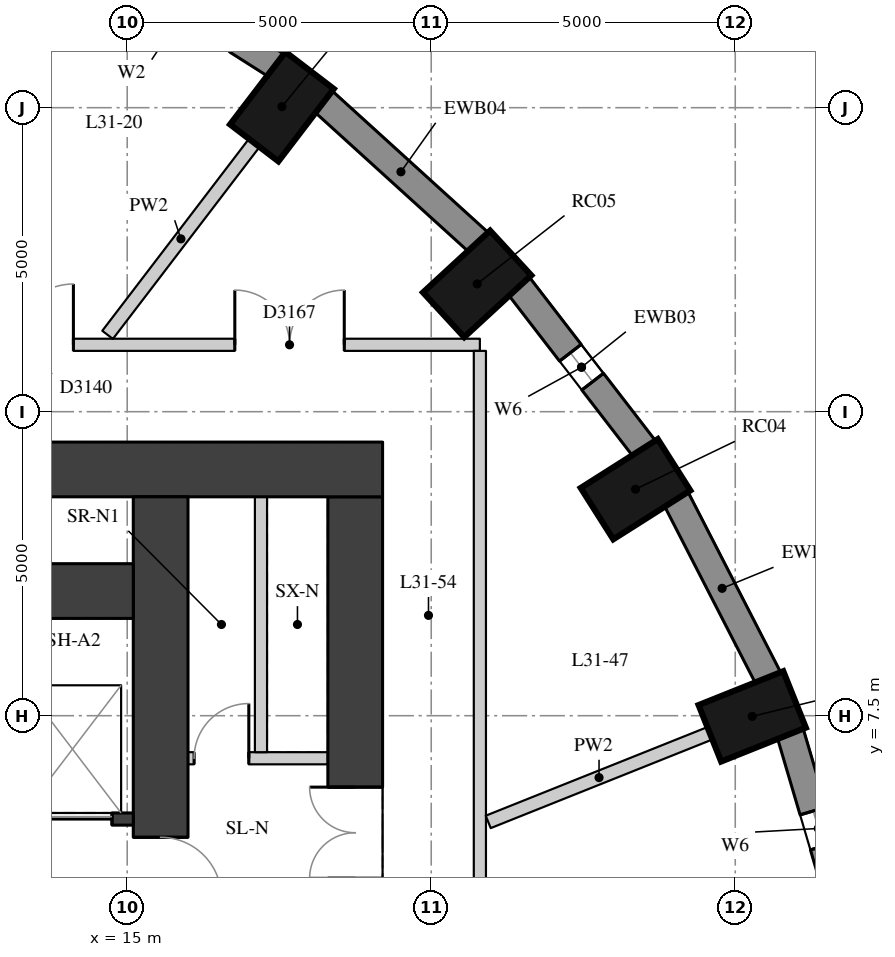
"""IFC4 building model, lengths in metres.
Left out: names, types, materials, properties, quantities, classifications, styles, units other than length and angle.
Written with IfcOpenShell. Run it as: python <this file> out.ifc"""

import sys

from ifc_helpers import new_model, si_unit, direction, frame, frame_2d, origin, origin_2d, place, context, subcontext, project, spatial, rectangle, extrude, element, fill, save


model = new_model("IFC4")
c1 = context("Model", 3, precision=1e-05, world=origin(), true_north=direction((0.0, 1.0)))
c2 = subcontext(c1, "Body", "Model", "MODEL_VIEW")
j1 = project(units=[si_unit("LENGTHUNIT", "METRE"), si_unit("PLANEANGLEUNIT", "RADIAN")], contexts=[c1])
p1 = place(None, origin())
s1 = spatial("IfcSite", under=j1, at=p1, CompositionType="ELEMENT")
p2 = place(p1, origin())
s2 = spatial("IfcBuilding", under=s1, at=p2, CompositionType="ELEMENT")
p3 = place(p2, frame((0.0, 0.0, 112.0)))
s3 = spatial("IfcBuildingStorey", under=s2, at=p3, CompositionType="ELEMENT", Elevation=112.0)
for number, where, z_axis, x_axis in (
    (1, (25.279, 7.489, 0.0), (0.0, 0.0, 1.0), (0.929, 0.371, 0.0)),
    (2, (23.36, 11.225, 0.0), (0.0, 0.0, 1.0), (0.845, 0.536, 0.0)),
    (3, (20.755, 14.602, 0.0), (0.0, 0.0, 1.0), (0.735, 0.678, 0.0)),
    (4, (17.545, 17.517, 0.0), (0.0, 0.0, 1.0), (0.607, 0.795, 0.0)),
):
    element("IfcColumn", number, at=place(p3, frame(where, z_axis=z_axis, x_axis=x_axis)), inside=s3, PredefinedType="COLUMN", context=c2, shape_type="SweptSolid", body=[
        extrude(rectangle(XDim=1.5, YDim=1.0, at=origin_2d()), origin(), (0.0, 0.0, 1.0), 3.3),
    ])
p4 = place(p3, frame((26.832, 4.069, 0.0), z_axis=(0.0, 0.0, 1.0), x_axis=(-0.283002902729, 0.959119052593, 0.0)))
e5 = element("IfcWall", 5, at=p4, inside=s3, PredefinedType="SOLIDWALL", context=c2, shape_type="SweptSolid", body=[
    extrude(rectangle(XDim=3.286, YDim=0.45, at=frame_2d((1.643, 0.0))), origin(), (0.0, 0.0, 1.0), 3.02),
])
p5 = place(p4, frame((1.343, 0.0, 0.4)))
e6 = element("IfcOpeningElement", 6, at=p5, cuts=e5, PredefinedType="OPENING", context=c2, shape_type="SweptSolid", body=[
    extrude(rectangle(XDim=0.6, YDim=1.75, at=frame_2d((0.3, 0.875))), frame((0.0, 0.235, 0.0), z_axis=(0.0, -1.0, 0.0), x_axis=(1.0, 0.0, 0.0)), (0.0, 0.0, 1.0), 0.47),
])
p6 = place(p3, frame((25.545, 8.112, 0.0), z_axis=(0.0, 0.0, 1.0), x_axis=(-0.456828186229, 0.889554949549, 0.0)))
e7 = element("IfcWall", 7, at=p6, inside=s3, PredefinedType="SOLIDWALL", context=c2, shape_type="SweptSolid", body=[
    extrude(rectangle(XDim=3.333, YDim=0.45, at=frame_2d((1.667, 0.0))), origin(), (0.0, 0.0, 1.0), 3.02),
])
p7 = place(p3, frame((23.508, 11.887, 0.0), z_axis=(0.0, 0.0, 1.0), x_axis=(-0.610693945156, 0.791866721961, 0.0)))
e8 = element("IfcWall", 8, at=p7, inside=s3, PredefinedType="SOLIDWALL", context=c2, shape_type="SweptSolid", body=[
    extrude(rectangle(XDim=3.395, YDim=0.45, at=frame_2d((1.697, 0.0))), origin(), (0.0, 0.0, 1.0), 3.02),
])
p8 = place(p7, frame((1.397, 0.0, 0.4)))
e9 = element("IfcOpeningElement", 9, at=p8, cuts=e8, PredefinedType="OPENING", context=c2, shape_type="SweptSolid", body=[
    extrude(rectangle(XDim=0.6, YDim=1.75, at=frame_2d((0.3, 0.875))), frame((0.0, 0.235, 0.0), z_axis=(0.0, -1.0, 0.0), x_axis=(1.0, 0.0, 0.0)), (0.0, 0.0, 1.0), 0.47),
])
p9 = place(p3, frame((20.784, 15.281, 0.0), z_axis=(0.0, 0.0, 1.0), x_axis=(-0.74032902847, 0.672244694739, 0.0)))
e10 = element("IfcWall", 10, at=p9, inside=s3, PredefinedType="SOLIDWALL", context=c2, shape_type="SweptSolid", body=[
    extrude(rectangle(XDim=3.464, YDim=0.45, at=frame_2d((1.732, 0.0))), origin(), (0.0, 0.0, 1.0), 3.02),
])
p10 = place(p3, frame((17.456, 18.192, 0.0), z_axis=(0.0, 0.0, 1.0), x_axis=(-0.843880549131, 0.536531097699, 0.0)))
e11 = element("IfcWall", 11, at=p10, inside=s3, PredefinedType="SOLIDWALL", context=c2, shape_type="SweptSolid", body=[
    extrude(rectangle(XDim=3.532, YDim=0.45, at=frame_2d((1.766, 0.0))), origin(), (0.0, 0.0, 1.0), 3.02),
])
p11 = place(p10, frame((0.766, 0.0, 0.4)))
e12 = element("IfcOpeningElement", 12, at=p11, cuts=e11, PredefinedType="OPENING", context=c2, shape_type="SweptSolid", body=[
    extrude(rectangle(XDim=2.0, YDim=1.75, at=frame_2d((1.0, 0.875))), frame((0.0, 0.235, 0.0), z_axis=(0.0, -1.0, 0.0), x_axis=(1.0, 0.0, 0.0)), (0.0, 0.0, 1.0), 0.47),
])
p12 = place(p3, frame((18.75, -11.1, 0.0), z_axis=(0.0, 0.0, 1.0), x_axis=(0.0, 1.0, 0.0)))
e13 = element("IfcWall", 13, at=p12, inside=s3, PredefinedType="SHEAR", context=c2, shape_type="SweptSolid", body=[
    extrude(rectangle(XDim=22.2, YDim=0.9, at=frame_2d((11.1, 0.0))), origin(), (0.0, 0.0, 1.0), 3.02),
])
p13 = place(p12, frame((15.925, 0.0, 0.0)))
e14 = element("IfcOpeningElement", 14, at=p13, cuts=e13, PredefinedType="OPENING", context=c2, shape_type="SweptSolid", body=[
    extrude(rectangle(XDim=1.5, YDim=2.1, at=frame_2d((0.75, 1.05))), frame((0.0, 0.46, 0.0), z_axis=(0.0, -1.0, 0.0), x_axis=(1.0, 0.0, 0.0)), (0.0, 0.0, 1.0), 0.92),
])
p14 = place(p12, frame((4.525, 0.0, 0.0)))
e15 = element("IfcOpeningElement", 15, at=p14, cuts=e13, PredefinedType="OPENING", context=c2, shape_type="SweptSolid", body=[
    extrude(rectangle(XDim=1.5, YDim=2.1, at=frame_2d((0.75, 1.05))), frame((0.0, 0.46, 0.0), z_axis=(0.0, -1.0, 0.0), x_axis=(1.0, 0.0, 0.0)), (0.0, 0.0, 1.0), 0.92),
])
p15 = place(p3, frame((4.0, 11.55, 0.0), z_axis=(0.0, 0.0, 1.0), x_axis=(1.0, 0.0, 0.0)))
e16 = element("IfcWall", 16, at=p15, inside=s3, PredefinedType="SHEAR", context=c2, shape_type="SweptSolid", body=[
    extrude(rectangle(XDim=15.2, YDim=0.9, at=frame_2d((7.6, 0.0))), origin(), (0.0, 0.0, 1.0), 3.02),
])
p16 = place(p3, frame((15.55, -11.1, 0.0), z_axis=(0.0, 0.0, 1.0), x_axis=(0.0, 1.0, 0.0)))
e17 = element("IfcWall", 17, at=p16, inside=s3, PredefinedType="SHEAR", context=c2, shape_type="SweptSolid", body=[
    extrude(rectangle(XDim=22.2, YDim=0.9, at=frame_2d((11.1, 0.0))), origin(), (0.0, 0.0, 1.0), 3.02),
])
p17 = place(p16, frame((15.6, 0.0, 0.0)))
e18 = element("IfcOpeningElement", 18, at=p17, cuts=e17, PredefinedType="OPENING", context=c2, shape_type="SweptSolid", body=[
    extrude(rectangle(XDim=1.0, YDim=2.1, at=frame_2d((0.5, 1.05))), frame((0.0, 0.46, 0.0), z_axis=(0.0, -1.0, 0.0), x_axis=(1.0, 0.0, 0.0)), (0.0, 0.0, 1.0), 0.92),
])
p18 = place(p16, frame((5.6, 0.0, 0.0)))
e19 = element("IfcOpeningElement", 19, at=p18, cuts=e17, PredefinedType="OPENING", context=c2, shape_type="SweptSolid", body=[
    extrude(rectangle(XDim=1.0, YDim=2.1, at=frame_2d((0.5, 1.05))), frame((0.0, 0.46, 0.0), z_axis=(0.0, -1.0, 0.0), x_axis=(1.0, 0.0, 0.0)), (0.0, 0.0, 1.0), 0.92),
])
p19 = place(p3, frame((4.9, 9.55, 0.0), z_axis=(0.0, 0.0, 1.0), x_axis=(1.0, 0.0, 0.0)))
e20 = element("IfcWall", 20, at=p19, inside=s3, PredefinedType="SHEAR", context=c2, shape_type="SweptSolid", body=[
    extrude(rectangle(XDim=10.2, YDim=0.9, at=frame_2d((5.1, 0.0))), origin(), (0.0, 0.0, 1.0), 3.02),
])
p20 = place(p3, frame((4.9, 5.8, 0.0), z_axis=(0.0, 0.0, 1.0), x_axis=(1.0, 0.0, 0.0)))
e21 = element("IfcWall", 21, at=p20, inside=s3, PredefinedType="SHEAR", context=c2, shape_type="SweptSolid", body=[
    extrude(rectangle(XDim=10.2, YDim=0.2, at=frame_2d((5.1, 0.0))), origin(), (0.0, 0.0, 1.0), 3.02),
])
p21 = place(p20, frame((6.75, 0.0, 0.0)))
e22 = element("IfcOpeningElement", 22, at=p21, cuts=e21, PredefinedType="OPENING", context=c2, shape_type="SweptSolid", body=[
    extrude(rectangle(XDim=1.1, YDim=2.1, at=frame_2d((0.55, 1.05))), frame((0.0, 0.11, 0.0), z_axis=(0.0, -1.0, 0.0), x_axis=(1.0, 0.0, 0.0)), (0.0, 0.0, 1.0), 0.22),
])
p22 = place(p20, frame((8.75, 0.0, 0.0)))
e23 = element("IfcOpeningElement", 23, at=p22, cuts=e21, PredefinedType="OPENING", context=c2, shape_type="SweptSolid", body=[
    extrude(rectangle(XDim=1.1, YDim=2.1, at=frame_2d((0.55, 1.05))), frame((0.0, 0.11, 0.0), z_axis=(0.0, -1.0, 0.0), x_axis=(1.0, 0.0, 0.0)), (0.0, 0.0, 1.0), 0.22),
])
p23 = place(p3, frame((16.0, 6.8, 0.0), z_axis=(0.0, 0.0, 1.0), x_axis=(1.0, 0.0, 0.0)))
e24 = element("IfcWall", 24, at=p23, inside=s3, PredefinedType="PARTITIONING", context=c2, shape_type="SweptSolid", body=[
    extrude(rectangle(XDim=2.3, YDim=0.2, at=frame_2d((1.15, 0.0))), origin(), (0.0, 0.0, 1.0), 3.02),
])
p24 = place(p23, frame((0.1, 0.0, 0.0)))
e25 = element("IfcOpeningElement", 25, at=p24, cuts=e24, PredefinedType="OPENING", context=c2, shape_type="SweptSolid", body=[
    extrude(rectangle(XDim=0.9, YDim=2.1, at=frame_2d((0.45, 1.05))), frame((0.0, 0.11, 0.0), z_axis=(0.0, -1.0, 0.0), x_axis=(1.0, 0.0, 0.0)), (0.0, 0.0, 1.0), 0.22),
])
p25 = place(p3, frame((17.2, 6.9, 0.0), z_axis=(0.0, 0.0, 1.0), x_axis=(0.0, 1.0, 0.0)))
e26 = element("IfcWall", 26, at=p25, inside=s3, PredefinedType="PARTITIONING", context=c2, shape_type="SweptSolid", body=[
    extrude(rectangle(XDim=4.2, YDim=0.2, at=frame_2d((2.1, 0.0))), origin(), (0.0, 0.0, 1.0), 3.02),
])
p26 = place(p3, frame((5.303, 13.6, 0.0), z_axis=(0.0, 0.0, 1.0), x_axis=(1.0, 0.0, 0.0)))
e27 = element("IfcWall", 27, at=p26, inside=s3, PredefinedType="PARTITIONING", context=c2, shape_type="SweptSolid", body=[
    extrude(rectangle(XDim=15.497, YDim=0.2, at=frame_2d((7.749, 0.0))), origin(), (0.0, 0.0, 1.0), 3.02),
])
p27 = place(p26, frame((7.812, 0.0, 0.0)))
e28 = element("IfcOpeningElement", 28, at=p27, cuts=e27, PredefinedType="OPENING", context=c2, shape_type="SweptSolid", body=[
    extrude(rectangle(XDim=1.0, YDim=2.1, at=frame_2d((0.5, 1.05))), frame((0.0, 0.11, 0.0), z_axis=(0.0, -1.0, 0.0), x_axis=(1.0, 0.0, 0.0)), (0.0, 0.0, 1.0), 0.22),
])
p28 = place(p26, frame((0.957, 0.0, 0.0)))
e29 = element("IfcOpeningElement", 29, at=p28, cuts=e27, PredefinedType="OPENING", context=c2, shape_type="SweptSolid", body=[
    extrude(rectangle(XDim=1.1, YDim=2.1, at=frame_2d((0.55, 1.05))), frame((0.0, 0.11, 0.0), z_axis=(0.0, -1.0, 0.0), x_axis=(1.0, 0.0, 0.0)), (0.0, 0.0, 1.0), 0.22),
])
p29 = place(p26, frame((11.467, 0.0, 0.0)))
e30 = element("IfcOpeningElement", 30, at=p29, cuts=e27, PredefinedType="OPENING", context=c2, shape_type="SweptSolid", body=[
    extrude(rectangle(XDim=1.8, YDim=2.1, at=frame_2d((0.9, 1.05))), frame((0.0, 0.11, 0.0), z_axis=(0.0, -1.0, 0.0), x_axis=(1.0, 0.0, 0.0)), (0.0, 0.0, 1.0), 0.22),
])
p30 = place(p3, frame((20.8, 13.5, 0.0), z_axis=(0.0, 0.0, 1.0), x_axis=(0.0, -1.0, 0.0)))
e31 = element("IfcWall", 31, at=p30, inside=s3, PredefinedType="PARTITIONING", context=c2, shape_type="SweptSolid", body=[
    extrude(rectangle(XDim=27.1, YDim=0.2, at=frame_2d((13.55, 0.0))), origin(), (0.0, 0.0, 1.0), 3.02),
])
p31 = place(p30, frame((22.844, 0.0, 0.0)))
e32 = element("IfcOpeningElement", 32, at=p31, cuts=e31, PredefinedType="OPENING", context=c2, shape_type="SweptSolid", body=[
    extrude(rectangle(XDim=1.8, YDim=2.1, at=frame_2d((0.9, 1.05))), frame((0.0, 0.11, 0.0), z_axis=(0.0, -1.0, 0.0), x_axis=(1.0, 0.0, 0.0)), (0.0, 0.0, 1.0), 0.22),
])
p32 = place(p30, frame((16.35, 0.0, 0.0)))
e33 = element("IfcOpeningElement", 33, at=p32, cuts=e31, PredefinedType="OPENING", context=c2, shape_type="SweptSolid", body=[
    extrude(rectangle(XDim=1.8, YDim=2.1, at=frame_2d((0.9, 1.05))), frame((0.0, 0.11, 0.0), z_axis=(0.0, -1.0, 0.0), x_axis=(1.0, 0.0, 0.0)), (0.0, 0.0, 1.0), 0.22),
])
p33 = place(p30, frame((10.051, 0.0, 0.0)))
e34 = element("IfcOpeningElement", 34, at=p33, cuts=e31, PredefinedType="OPENING", context=c2, shape_type="SweptSolid", body=[
    extrude(rectangle(XDim=1.8, YDim=2.1, at=frame_2d((0.9, 1.05))), frame((0.0, 0.11, 0.0), z_axis=(0.0, -1.0, 0.0), x_axis=(1.0, 0.0, 0.0)), (0.0, 0.0, 1.0), 0.22),
])
p34 = place(p3, frame((24.583, 7.21, 0.0), z_axis=(0.0, 0.0, 1.0), x_axis=(-0.928528147853, -0.371262008083, 0.0)))
e35 = element("IfcWall", 35, at=p34, inside=s3, PredefinedType="PARTITIONING", context=c2, shape_type="SweptSolid", body=[
    extrude(rectangle(XDim=3.926, YDim=0.22, at=frame_2d((1.963, 0.0))), origin(), (0.0, 0.0, 1.0), 3.02),
])
p35 = place(p3, frame((17.089, 16.921, 0.0), z_axis=(0.0, 0.0, 1.0), x_axis=(-0.607055443677, -0.794659479464, 0.0)))
e36 = element("IfcWall", 36, at=p35, inside=s3, PredefinedType="PARTITIONING", context=c2, shape_type="SweptSolid", body=[
    extrude(rectangle(XDim=3.973, YDim=0.22, at=frame_2d((1.987, 0.0))), origin(), (0.0, 0.0, 1.0), 3.02),
])
p36 = place(p5, origin())
e37 = element("IfcWindow", 37, at=p36, inside=s3, PartitioningType="SINGLE_PANEL", PredefinedType="WINDOW", context=c2, shape_type="SweptSolid", body=[
    extrude(rectangle(XDim=0.6, YDim=1.75, at=frame_2d((0.3, 0.875))), frame((0.0, 0.035, 0.0), z_axis=(0.0, -1.0, 0.0), x_axis=(1.0, 0.0, 0.0)), (0.0, 0.0, 1.0), 0.06),
])
fill(e6, e37)
p37 = place(p8, origin())
e38 = element("IfcWindow", 38, at=p37, inside=s3, PartitioningType="SINGLE_PANEL", PredefinedType="WINDOW", context=c2, shape_type="SweptSolid", body=[
    extrude(rectangle(XDim=0.6, YDim=1.75, at=frame_2d((0.3, 0.875))), frame((0.0, 0.035, 0.0), z_axis=(0.0, -1.0, 0.0), x_axis=(1.0, 0.0, 0.0)), (0.0, 0.0, 1.0), 0.06),
])
fill(e9, e38)
p38 = place(p13, origin())
e39 = element("IfcDoor", 39, at=p38, inside=s3, OperationType="DOUBLE_DOOR_SINGLE_SWING", PredefinedType="DOOR", context=c2, shape_type="SweptSolid", body=[
    extrude(rectangle(XDim=1.5, YDim=2.1, at=frame_2d((0.75, 1.05))), frame((0.0, 0.025, 0.0), z_axis=(0.0, -1.0, 0.0), x_axis=(1.0, 0.0, 0.0)), (0.0, 0.0, 1.0), 0.05),
])
fill(e14, e39)
p39 = place(p22, origin())
e40 = element("IfcDoor", 40, at=p39, inside=s3, OperationType="DOUBLE_DOOR_SLIDING", PredefinedType="DOOR", context=c2, shape_type="SweptSolid", body=[
    extrude(rectangle(XDim=1.1, YDim=2.1, at=frame_2d((0.55, 1.05))), frame((0.0, 0.025, 0.0), z_axis=(0.0, -1.0, 0.0), x_axis=(1.0, 0.0, 0.0)), (0.0, 0.0, 1.0), 0.05),
])
fill(e23, e40)
p40 = place(p17, origin())
e41 = element("IfcDoor", 41, at=p40, inside=s3, OperationType="SINGLE_SWING_RIGHT", PredefinedType="DOOR", context=c2, shape_type="SweptSolid", body=[
    extrude(rectangle(XDim=1.0, YDim=2.1, at=frame_2d((0.5, 1.05))), frame((0.0, 0.025, 0.0), z_axis=(0.0, -1.0, 0.0), x_axis=(1.0, 0.0, 0.0)), (0.0, 0.0, 1.0), 0.05),
])
fill(e18, e41)
p41 = place(p24, origin())
e42 = element("IfcDoor", 42, at=p41, inside=s3, OperationType="SINGLE_SWING_RIGHT", PredefinedType="DOOR", context=c2, shape_type="SweptSolid", body=[
    extrude(rectangle(XDim=0.9, YDim=2.1, at=frame_2d((0.45, 1.05))), frame((0.0, 0.025, 0.0), z_axis=(0.0, -1.0, 0.0), x_axis=(1.0, 0.0, 0.0)), (0.0, 0.0, 1.0), 0.05),
])
fill(e25, e42)
p42 = place(p27, origin())
e43 = element("IfcDoor", 43, at=p42, inside=s3, OperationType="SINGLE_SWING_RIGHT", PredefinedType="DOOR", context=c2, shape_type="SweptSolid", body=[
    extrude(rectangle(XDim=1.0, YDim=2.1, at=frame_2d((0.5, 1.05))), frame((0.0, 0.025, 0.0), z_axis=(0.0, -1.0, 0.0), x_axis=(1.0, 0.0, 0.0)), (0.0, 0.0, 1.0), 0.05),
])
fill(e28, e43)
p43 = place(p29, origin())
e44 = element("IfcDoor", 44, at=p43, inside=s3, OperationType="DOUBLE_DOOR_SINGLE_SWING", PredefinedType="DOOR", context=c2, shape_type="SweptSolid", body=[
    extrude(rectangle(XDim=1.8, YDim=2.1, at=frame_2d((0.9, 1.05))), frame((0.0, 0.025, 0.0), z_axis=(0.0, -1.0, 0.0), x_axis=(1.0, 0.0, 0.0)), (0.0, 0.0, 1.0), 0.05),
])
fill(e30, e44)
save(model, sys.argv[1])
